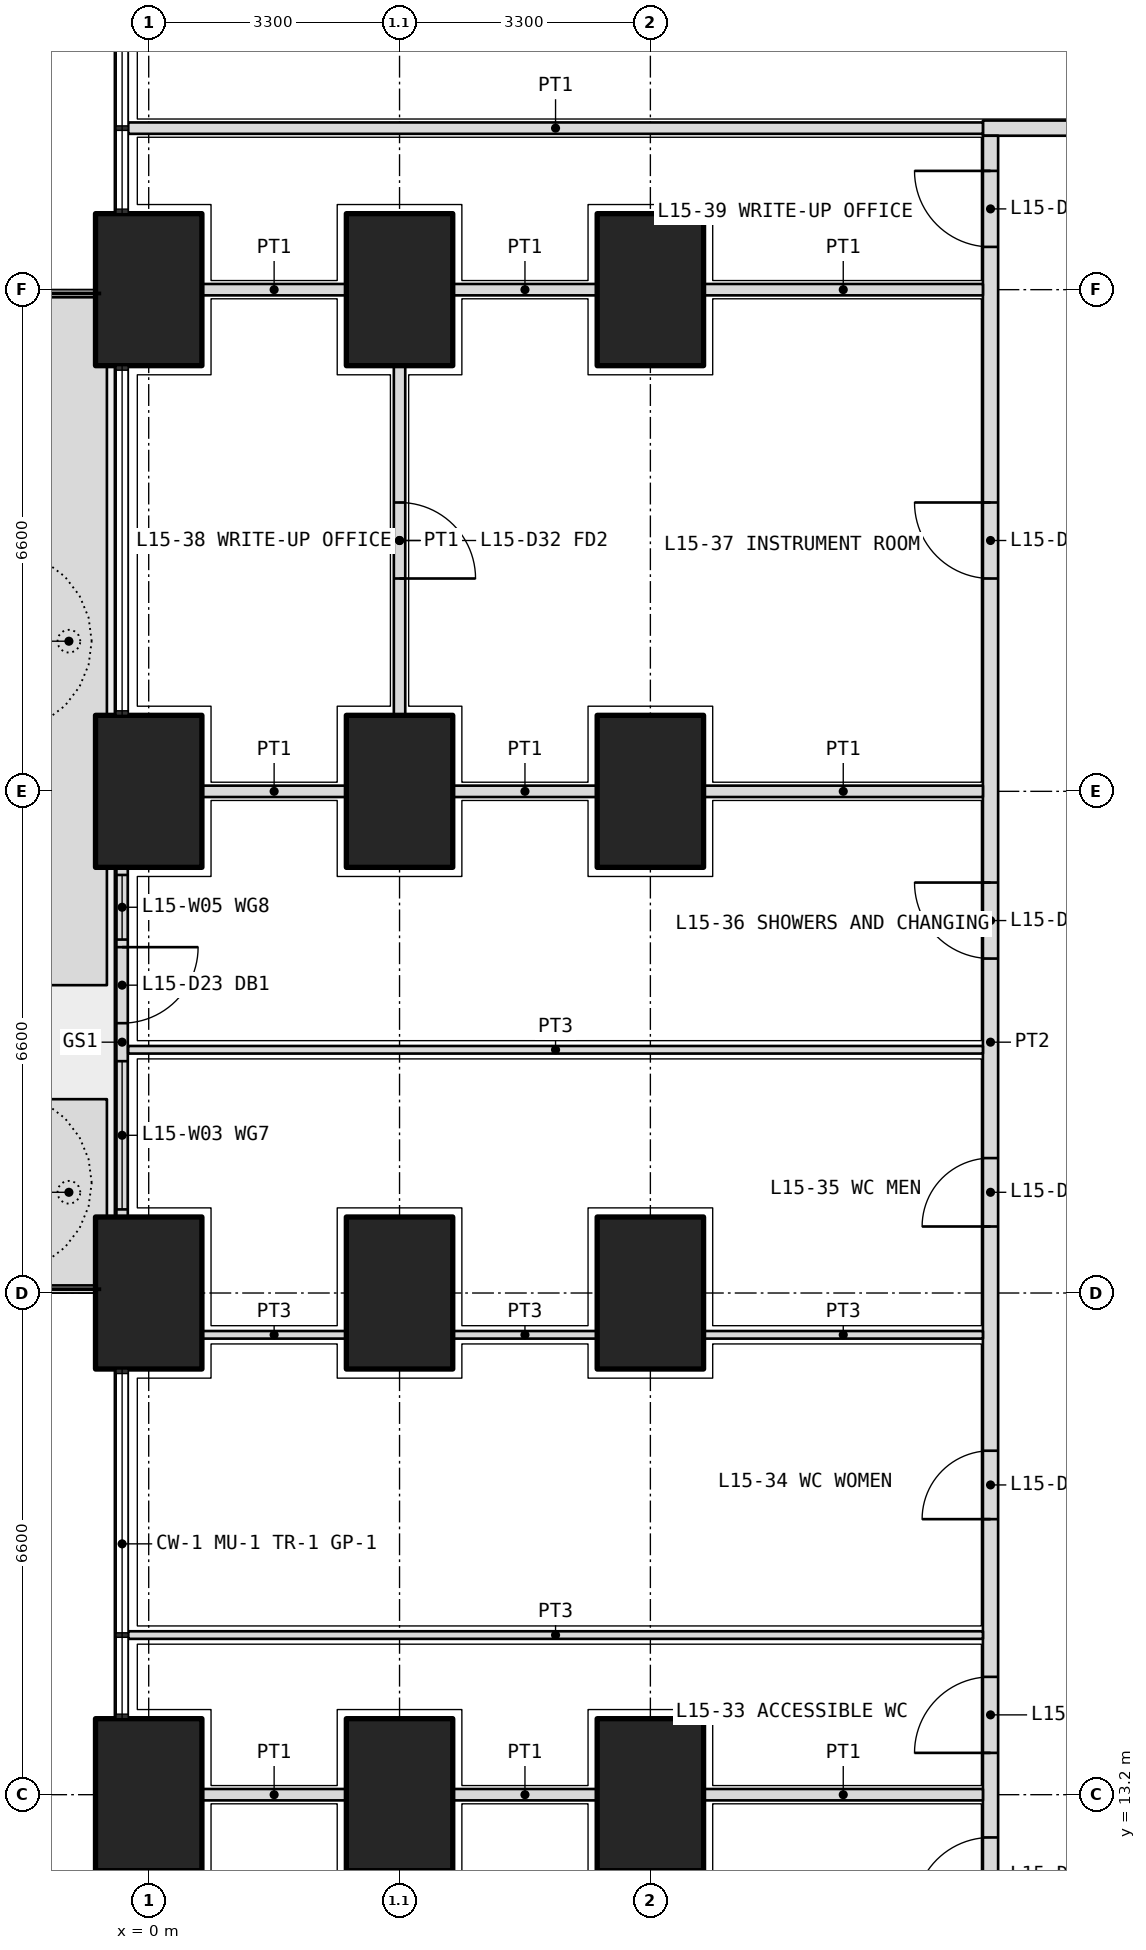
"""IFC4 building model, lengths in metres.
Left out: names, types, materials, properties, quantities, classifications, styles, units other than length and angle.
Written with IfcOpenShell. Run it as: python <this file> out.ifc"""

import sys

from ifc_helpers import new_model, si_unit, direction, frame, frame_2d, origin, origin_2d, place, context, subcontext, project, spatial, polyline, rectangle, outline, extrude, element, fill, save


model = new_model("IFC4")
c1 = context("Model", 3, precision=1e-05, world=origin(), true_north=direction((0.0, 1.0)))
c2 = subcontext(c1, "Body", "Model", "MODEL_VIEW")
j1 = project(units=[si_unit("LENGTHUNIT", "METRE"), si_unit("PLANEANGLEUNIT", "RADIAN")], contexts=[c1])
p1 = place(None, origin())
s1 = spatial("IfcSite", under=j1, at=p1, CompositionType="ELEMENT")
p2 = place(p1, origin())
s2 = spatial("IfcBuilding", under=s1, at=p2, CompositionType="ELEMENT")
p3 = place(p2, frame((0.0, 0.0, 67.5)))
s3 = spatial("IfcBuildingStorey", under=s2, at=p3, CompositionType="ELEMENT", Elevation=67.5)
for number, where, z_axis, x_axis in (
    (1, (0.0, 13.2, 0.0), (0.0, 0.0, 1.0), (0.0, 1.0, 0.0)),
    (2, (0.0, 19.8, 0.0), (0.0, 0.0, 1.0), (0.0, 1.0, 0.0)),
    (3, (0.0, 26.4, 0.0), (0.0, 0.0, 1.0), (0.0, 1.0, 0.0)),
    (4, (0.0, 33.0, 0.0), (0.0, 0.0, 1.0), (0.0, 1.0, 0.0)),
    (5, (3.3, 13.2, 0.0), (0.0, 0.0, 1.0), (0.0, 1.0, 0.0)),
    (6, (3.3, 19.8, 0.0), (0.0, 0.0, 1.0), (0.0, 1.0, 0.0)),
    (7, (3.3, 26.4, 0.0), (0.0, 0.0, 1.0), (0.0, 1.0, 0.0)),
    (8, (3.3, 33.0, 0.0), (0.0, 0.0, 1.0), (0.0, 1.0, 0.0)),
    (9, (6.6, 13.2, 0.0), (0.0, 0.0, 1.0), (0.0, 1.0, 0.0)),
    (10, (6.6, 19.8, 0.0), (0.0, 0.0, 1.0), (0.0, 1.0, 0.0)),
    (11, (6.6, 26.4, 0.0), (0.0, 0.0, 1.0), (0.0, 1.0, 0.0)),
    (12, (6.6, 33.0, 0.0), (0.0, 0.0, 1.0), (0.0, 1.0, 0.0)),
):
    element("IfcColumn", number, at=place(p3, frame(where, z_axis=z_axis, x_axis=x_axis)), inside=s3, PredefinedType="COLUMN", context=c2, shape_type="SweptSolid", body=[
        extrude(rectangle(XDim=2.0, YDim=1.4, at=origin_2d()), origin(), (0.0, 0.0, 1.0), 4.2),
    ])
p4 = place(p3, origin())
e13 = element("IfcWall", 13, at=p4, inside=s3, PredefinedType="USERDEFINED", context=c2, shape_type="SweptSolid", body=[
    extrude(outline(polyline([(-1.55, 19.9), (-0.55, 19.9), (-0.55, 22.35), (-1.55, 22.35), (-1.55, 19.9)]), holes=[polyline([(-1.4, 20.05), (-0.7, 20.05), (-0.7, 22.2), (-1.4, 22.2), (-1.4, 20.05)])]), origin(), (0.0, 0.0, 1.0), 1.05),
])
p5 = place(p3, origin())
e14 = element("IfcWall", 14, at=p5, inside=s3, PredefinedType="USERDEFINED", context=c2, shape_type="SweptSolid", body=[
    extrude(outline(polyline([(-1.55, 23.85), (-0.55, 23.85), (-0.55, 32.9), (-1.55, 32.9), (-1.55, 23.85)]), holes=[polyline([(-1.4, 24.0), (-0.7, 24.0), (-0.7, 32.75), (-1.4, 32.75), (-1.4, 24.0)])]), origin(), (0.0, 0.0, 1.0), 1.05),
])
p6 = place(p3, frame((-0.35, 25.4, 0.0), z_axis=(0.0, 0.0, 1.0), x_axis=(0.0, -1.0, 0.0)))
e15 = element("IfcWall", 15, at=p6, inside=s3, PredefinedType="SOLIDWALL", context=c2, shape_type="SweptSolid", body=[
    extrude(rectangle(XDim=4.6, YDim=0.15, at=frame_2d((2.3, 0.0))), origin(), (0.0, 0.0, 1.0), 2.6),
])
p7 = place(p6, frame((1.05, 0.0, 0.0)))
e16 = element("IfcOpeningElement", 16, at=p7, cuts=e15, PredefinedType="OPENING", context=c2, shape_type="SweptSolid", body=[
    extrude(rectangle(XDim=1.0, YDim=2.4, at=frame_2d((0.5, 1.2))), frame((0.0, 0.085, 0.0), z_axis=(0.0, -1.0, 0.0), x_axis=(1.0, 0.0, 0.0)), (0.0, 0.0, 1.0), 0.17),
])
p8 = place(p6, frame((0.1, 0.0, 0.1)))
e17 = element("IfcOpeningElement", 17, at=p8, cuts=e15, PredefinedType="OPENING", context=c2, shape_type="SweptSolid", body=[
    extrude(rectangle(XDim=0.85, YDim=2.2, at=frame_2d((0.425, 1.1))), frame((0.0, 0.085, 0.0), z_axis=(0.0, -1.0, 0.0), x_axis=(1.0, 0.0, 0.0)), (0.0, 0.0, 1.0), 0.17),
])
p9 = place(p6, frame((2.55, 0.0, 0.1)))
e18 = element("IfcOpeningElement", 18, at=p9, cuts=e15, PredefinedType="OPENING", context=c2, shape_type="SweptSolid", body=[
    extrude(rectangle(XDim=1.95, YDim=2.2, at=frame_2d((0.975, 1.1))), frame((0.0, 0.085, 0.0), z_axis=(0.0, -1.0, 0.0), x_axis=(1.0, 0.0, 0.0)), (0.0, 0.0, 1.0), 0.17),
])
p10 = place(p3, frame((10.975, 35.125, 0.0), z_axis=(0.0, 0.0, 1.0), x_axis=(1.0, 0.0, 0.0)))
e19 = element("IfcWall", 19, at=p10, inside=s3, PredefinedType="PARTITIONING", context=c2, shape_type="SweptSolid", body=[
    extrude(rectangle(XDim=8.825, YDim=0.2, at=frame_2d((4.413, 0.0))), origin(), (0.0, 0.0, 1.0), 2.85),
])
p11 = place(p10, frame((2.312, 0.0, 0.0)))
e20 = element("IfcOpeningElement", 20, at=p11, cuts=e19, PredefinedType="OPENING", context=c2, shape_type="SweptSolid", body=[
    extrude(rectangle(XDim=1.0, YDim=2.1, at=frame_2d((0.5, 1.05))), frame((0.0, 0.11, 0.0), z_axis=(0.0, -1.0, 0.0), x_axis=(1.0, 0.0, 0.0)), (0.0, 0.0, 1.0), 0.22),
])
p12 = place(p10, frame((6.675, 0.0, 0.0)))
e21 = element("IfcOpeningElement", 21, at=p12, cuts=e19, PredefinedType="OPENING", context=c2, shape_type="SweptSolid", body=[
    extrude(rectangle(XDim=1.0, YDim=2.1, at=frame_2d((0.5, 1.05))), frame((0.0, 0.11, 0.0), z_axis=(0.0, -1.0, 0.0), x_axis=(1.0, 0.0, 0.0)), (0.0, 0.0, 1.0), 0.22),
])
p13 = place(p3, frame((11.075, 11.175, 0.0), z_axis=(0.0, 0.0, 1.0), x_axis=(0.0, 1.0, 0.0)))
e22 = element("IfcWall", 22, at=p13, inside=s3, PredefinedType="PARTITIONING", context=c2, shape_type="SweptSolid", body=[
    extrude(rectangle(XDim=23.85, YDim=0.2, at=frame_2d((11.925, 0.0))), origin(), (0.0, 0.0, 1.0), 2.85),
])
p14 = place(p13, frame((0.462, 0.0, 0.0)))
e23 = element("IfcOpeningElement", 23, at=p14, cuts=e22, PredefinedType="OPENING", context=c2, shape_type="SweptSolid", body=[
    extrude(rectangle(XDim=1.0, YDim=2.1, at=frame_2d((0.5, 1.05))), frame((0.0, 0.11, 0.0), z_axis=(0.0, -1.0, 0.0), x_axis=(1.0, 0.0, 0.0)), (0.0, 0.0, 1.0), 0.22),
])
p15 = place(p13, frame((2.575, 0.0, 0.0)))
e24 = element("IfcOpeningElement", 24, at=p15, cuts=e22, PredefinedType="OPENING", context=c2, shape_type="SweptSolid", body=[
    extrude(rectangle(XDim=1.0, YDim=2.1, at=frame_2d((0.5, 1.05))), frame((0.0, 0.11, 0.0), z_axis=(0.0, -1.0, 0.0), x_axis=(1.0, 0.0, 0.0)), (0.0, 0.0, 1.0), 0.22),
])
p16 = place(p13, frame((5.65, 0.0, 0.0)))
e25 = element("IfcOpeningElement", 25, at=p16, cuts=e22, PredefinedType="OPENING", context=c2, shape_type="SweptSolid", body=[
    extrude(rectangle(XDim=0.9, YDim=2.1, at=frame_2d((0.45, 1.05))), frame((0.0, 0.11, 0.0), z_axis=(0.0, -1.0, 0.0), x_axis=(1.0, 0.0, 0.0)), (0.0, 0.0, 1.0), 0.22),
])
p17 = place(p13, frame((9.5, 0.0, 0.0)))
e26 = element("IfcOpeningElement", 26, at=p17, cuts=e22, PredefinedType="OPENING", context=c2, shape_type="SweptSolid", body=[
    extrude(rectangle(XDim=0.9, YDim=2.1, at=frame_2d((0.45, 1.05))), frame((0.0, 0.11, 0.0), z_axis=(0.0, -1.0, 0.0), x_axis=(1.0, 0.0, 0.0)), (0.0, 0.0, 1.0), 0.22),
])
p18 = place(p13, frame((13.025, 0.0, 0.0)))
e27 = element("IfcOpeningElement", 27, at=p18, cuts=e22, PredefinedType="OPENING", context=c2, shape_type="SweptSolid", body=[
    extrude(rectangle(XDim=1.0, YDim=2.1, at=frame_2d((0.5, 1.05))), frame((0.0, 0.11, 0.0), z_axis=(0.0, -1.0, 0.0), x_axis=(1.0, 0.0, 0.0)), (0.0, 0.0, 1.0), 0.22),
])
p19 = place(p13, frame((18.025, 0.0, 0.0)))
e28 = element("IfcOpeningElement", 28, at=p19, cuts=e22, PredefinedType="OPENING", context=c2, shape_type="SweptSolid", body=[
    extrude(rectangle(XDim=1.0, YDim=2.1, at=frame_2d((0.5, 1.05))), frame((0.0, 0.11, 0.0), z_axis=(0.0, -1.0, 0.0), x_axis=(1.0, 0.0, 0.0)), (0.0, 0.0, 1.0), 0.22),
])
p20 = place(p13, frame((22.387, 0.0, 0.0)))
e29 = element("IfcOpeningElement", 29, at=p20, cuts=e22, PredefinedType="OPENING", context=c2, shape_type="SweptSolid", body=[
    extrude(rectangle(XDim=1.0, YDim=2.1, at=frame_2d((0.5, 1.05))), frame((0.0, 0.11, 0.0), z_axis=(0.0, -1.0, 0.0), x_axis=(1.0, 0.0, 0.0)), (0.0, 0.0, 1.0), 0.22),
])
p21 = place(p3, frame((-0.27, 35.125, 0.0), z_axis=(0.0, 0.0, 1.0), x_axis=(1.0, 0.0, 0.0)))
e30 = element("IfcWall", 30, at=p21, inside=s3, PredefinedType="PARTITIONING", context=c2, shape_type="SweptSolid", body=[
    extrude(rectangle(XDim=11.245, YDim=0.15, at=frame_2d((5.623, 0.0))), origin(), (0.0, 0.0, 1.0), 2.6),
])
p22 = place(p3, frame((3.3, 32.0, 0.0), z_axis=(0.0, 0.0, 1.0), x_axis=(0.0, -1.0, 0.0)))
e31 = element("IfcWall", 31, at=p22, inside=s3, PredefinedType="PARTITIONING", context=c2, shape_type="SweptSolid", body=[
    extrude(rectangle(XDim=4.6, YDim=0.15, at=frame_2d((2.3, 0.0))), origin(), (0.0, 0.0, 1.0), 3.9),
])
p23 = place(p22, frame((1.8, 0.0, 0.0)))
e32 = element("IfcOpeningElement", 32, at=p23, cuts=e31, PredefinedType="OPENING", context=c2, shape_type="SweptSolid", body=[
    extrude(rectangle(XDim=1.0, YDim=2.1, at=frame_2d((0.5, 1.05))), frame((0.0, 0.085, 0.0), z_axis=(0.0, -1.0, 0.0), x_axis=(1.0, 0.0, 0.0)), (0.0, 0.0, 1.0), 0.17),
])
p24 = place(p3, frame((3.3, 12.2, 0.0), z_axis=(0.0, 0.0, 1.0), x_axis=(0.0, -1.0, 0.0)))
e33 = element("IfcWall", 33, at=p24, inside=s3, PredefinedType="PARTITIONING", context=c2, shape_type="SweptSolid", body=[
    extrude(rectangle(XDim=4.6, YDim=0.15, at=frame_2d((2.3, 0.0))), origin(), (0.0, 0.0, 1.0), 3.9),
])
p25 = place(p24, frame((3.35, 0.0, 0.0)))
e34 = element("IfcOpeningElement", 34, at=p25, cuts=e33, PredefinedType="OPENING", context=c2, shape_type="SweptSolid", body=[
    extrude(rectangle(XDim=1.0, YDim=2.1, at=frame_2d((0.5, 1.05))), frame((0.0, 0.085, 0.0), z_axis=(0.0, -1.0, 0.0), x_axis=(1.0, 0.0, 0.0)), (0.0, 0.0, 1.0), 0.17),
])
p26 = place(p3, frame((-0.27, 15.3, 0.0), z_axis=(0.0, 0.0, 1.0), x_axis=(1.0, 0.0, 0.0)))
e35 = element("IfcWall", 35, at=p26, inside=s3, PredefinedType="PARTITIONING", context=c2, shape_type="SweptSolid", body=[
    extrude(rectangle(XDim=11.245, YDim=0.1, at=frame_2d((5.623, 0.0))), origin(), (0.0, 0.0, 1.0), 2.6),
])
p27 = place(p3, frame((0.7, 19.25, 0.0), z_axis=(0.0, 0.0, 1.0), x_axis=(1.0, 0.0, 0.0)))
e36 = element("IfcWall", 36, at=p27, inside=s3, PredefinedType="PARTITIONING", context=c2, shape_type="SweptSolid", body=[
    extrude(rectangle(XDim=1.9, YDim=0.1, at=frame_2d((0.95, 0.0))), origin(), (0.0, 0.0, 1.0), 2.85),
])
p28 = place(p3, frame((4.0, 19.25, 0.0), z_axis=(0.0, 0.0, 1.0), x_axis=(1.0, 0.0, 0.0)))
e37 = element("IfcWall", 37, at=p28, inside=s3, PredefinedType="PARTITIONING", context=c2, shape_type="SweptSolid", body=[
    extrude(rectangle(XDim=1.9, YDim=0.1, at=frame_2d((0.95, 0.0))), origin(), (0.0, 0.0, 1.0), 2.85),
])
p29 = place(p3, frame((7.3, 19.25, 0.0), z_axis=(0.0, 0.0, 1.0), x_axis=(1.0, 0.0, 0.0)))
e38 = element("IfcWall", 38, at=p29, inside=s3, PredefinedType="PARTITIONING", context=c2, shape_type="SweptSolid", body=[
    extrude(rectangle(XDim=3.675, YDim=0.1, at=frame_2d((1.837, 0.0))), origin(), (0.0, 0.0, 1.0), 2.85),
])
p30 = place(p3, frame((-0.27, 23.0, 0.0), z_axis=(0.0, 0.0, 1.0), x_axis=(1.0, 0.0, 0.0)))
e39 = element("IfcWall", 39, at=p30, inside=s3, PredefinedType="PARTITIONING", context=c2, shape_type="SweptSolid", body=[
    extrude(rectangle(XDim=11.245, YDim=0.1, at=frame_2d((5.623, 0.0))), origin(), (0.0, 0.0, 1.0), 2.6),
])
p31 = place(p3, frame((0.7, 13.2, 0.0), z_axis=(0.0, 0.0, 1.0), x_axis=(1.0, 0.0, 0.0)))
e40 = element("IfcWall", 40, at=p31, inside=s3, PredefinedType="PARTITIONING", context=c2, shape_type="SweptSolid", body=[
    extrude(rectangle(XDim=1.9, YDim=0.15, at=frame_2d((0.95, 0.0))), origin(), (0.0, 0.0, 1.0), 2.85),
])
p32 = place(p3, frame((4.0, 13.2, 0.0), z_axis=(0.0, 0.0, 1.0), x_axis=(1.0, 0.0, 0.0)))
e41 = element("IfcWall", 41, at=p32, inside=s3, PredefinedType="PARTITIONING", context=c2, shape_type="SweptSolid", body=[
    extrude(rectangle(XDim=1.9, YDim=0.15, at=frame_2d((0.95, 0.0))), origin(), (0.0, 0.0, 1.0), 2.85),
])
p33 = place(p3, frame((7.3, 13.2, 0.0), z_axis=(0.0, 0.0, 1.0), x_axis=(1.0, 0.0, 0.0)))
e42 = element("IfcWall", 42, at=p33, inside=s3, PredefinedType="PARTITIONING", context=c2, shape_type="SweptSolid", body=[
    extrude(rectangle(XDim=3.675, YDim=0.15, at=frame_2d((1.837, 0.0))), origin(), (0.0, 0.0, 1.0), 2.85),
])
p34 = place(p3, frame((0.7, 26.4, 0.0), z_axis=(0.0, 0.0, 1.0), x_axis=(1.0, 0.0, 0.0)))
e43 = element("IfcWall", 43, at=p34, inside=s3, PredefinedType="PARTITIONING", context=c2, shape_type="SweptSolid", body=[
    extrude(rectangle(XDim=1.9, YDim=0.15, at=frame_2d((0.95, 0.0))), origin(), (0.0, 0.0, 1.0), 2.85),
])
p35 = place(p3, frame((4.0, 26.4, 0.0), z_axis=(0.0, 0.0, 1.0), x_axis=(1.0, 0.0, 0.0)))
e44 = element("IfcWall", 44, at=p35, inside=s3, PredefinedType="PARTITIONING", context=c2, shape_type="SweptSolid", body=[
    extrude(rectangle(XDim=1.9, YDim=0.15, at=frame_2d((0.95, 0.0))), origin(), (0.0, 0.0, 1.0), 2.85),
])
p36 = place(p3, frame((7.3, 26.4, 0.0), z_axis=(0.0, 0.0, 1.0), x_axis=(1.0, 0.0, 0.0)))
e45 = element("IfcWall", 45, at=p36, inside=s3, PredefinedType="PARTITIONING", context=c2, shape_type="SweptSolid", body=[
    extrude(rectangle(XDim=3.675, YDim=0.15, at=frame_2d((1.837, 0.0))), origin(), (0.0, 0.0, 1.0), 2.85),
])
p37 = place(p3, frame((0.7, 33.0, 0.0), z_axis=(0.0, 0.0, 1.0), x_axis=(1.0, 0.0, 0.0)))
e46 = element("IfcWall", 46, at=p37, inside=s3, PredefinedType="PARTITIONING", context=c2, shape_type="SweptSolid", body=[
    extrude(rectangle(XDim=1.9, YDim=0.15, at=frame_2d((0.95, 0.0))), origin(), (0.0, 0.0, 1.0), 2.85),
])
p38 = place(p3, frame((4.0, 33.0, 0.0), z_axis=(0.0, 0.0, 1.0), x_axis=(1.0, 0.0, 0.0)))
e47 = element("IfcWall", 47, at=p38, inside=s3, PredefinedType="PARTITIONING", context=c2, shape_type="SweptSolid", body=[
    extrude(rectangle(XDim=1.9, YDim=0.15, at=frame_2d((0.95, 0.0))), origin(), (0.0, 0.0, 1.0), 2.85),
])
p39 = place(p3, frame((7.3, 33.0, 0.0), z_axis=(0.0, 0.0, 1.0), x_axis=(1.0, 0.0, 0.0)))
e48 = element("IfcWall", 48, at=p39, inside=s3, PredefinedType="PARTITIONING", context=c2, shape_type="SweptSolid", body=[
    extrude(rectangle(XDim=3.675, YDim=0.15, at=frame_2d((1.837, 0.0))), origin(), (0.0, 0.0, 1.0), 2.85),
])
p40 = place(p7, origin())
e49 = element("IfcDoor", 49, at=p40, inside=s3, OperationType="SINGLE_SWING_LEFT", PredefinedType="DOOR", context=c2, shape_type="SweptSolid", body=[
    extrude(rectangle(XDim=1.0, YDim=2.4, at=frame_2d((0.5, 1.2))), frame((0.0, 0.025, 0.0), z_axis=(0.0, -1.0, 0.0), x_axis=(1.0, 0.0, 0.0)), (0.0, 0.0, 1.0), 0.05),
])
fill(e16, e49)
p41 = place(p8, origin())
e50 = element("IfcWindow", 50, at=p41, inside=s3, PartitioningType="SINGLE_PANEL", PredefinedType="WINDOW", context=c2, shape_type="SweptSolid", body=[
    extrude(rectangle(XDim=0.85, YDim=2.2, at=frame_2d((0.425, 1.1))), frame((0.0, 0.03, 0.0), z_axis=(0.0, -1.0, 0.0), x_axis=(1.0, 0.0, 0.0)), (0.0, 0.0, 1.0), 0.06),
])
fill(e17, e50)
p42 = place(p9, origin())
e51 = element("IfcWindow", 51, at=p42, inside=s3, PartitioningType="SINGLE_PANEL", PredefinedType="WINDOW", context=c2, shape_type="SweptSolid", body=[
    extrude(rectangle(XDim=1.95, YDim=2.2, at=frame_2d((0.975, 1.1))), frame((0.0, 0.03, 0.0), z_axis=(0.0, -1.0, 0.0), x_axis=(1.0, 0.0, 0.0)), (0.0, 0.0, 1.0), 0.06),
])
fill(e18, e51)
p43 = place(p14, origin())
e52 = element("IfcDoor", 52, at=p43, inside=s3, OperationType="SINGLE_SWING_LEFT", PredefinedType="DOOR", context=c2, shape_type="SweptSolid", body=[
    extrude(rectangle(XDim=1.0, YDim=2.1, at=frame_2d((0.5, 1.05))), frame((0.0, 0.025, 0.0), z_axis=(0.0, -1.0, 0.0), x_axis=(1.0, 0.0, 0.0)), (0.0, 0.0, 1.0), 0.05),
])
fill(e23, e52)
p44 = place(p15, origin())
e53 = element("IfcDoor", 53, at=p44, inside=s3, OperationType="SINGLE_SWING_LEFT", PredefinedType="DOOR", context=c2, shape_type="SweptSolid", body=[
    extrude(rectangle(XDim=1.0, YDim=2.1, at=frame_2d((0.5, 1.05))), frame((0.0, 0.025, 0.0), z_axis=(0.0, -1.0, 0.0), x_axis=(1.0, 0.0, 0.0)), (0.0, 0.0, 1.0), 0.05),
])
fill(e24, e53)
p45 = place(p16, origin())
e54 = element("IfcDoor", 54, at=p45, inside=s3, OperationType="SINGLE_SWING_LEFT", PredefinedType="DOOR", context=c2, shape_type="SweptSolid", body=[
    extrude(rectangle(XDim=0.9, YDim=2.1, at=frame_2d((0.45, 1.05))), frame((0.0, 0.025, 0.0), z_axis=(0.0, -1.0, 0.0), x_axis=(1.0, 0.0, 0.0)), (0.0, 0.0, 1.0), 0.05),
])
fill(e25, e54)
p46 = place(p17, origin())
e55 = element("IfcDoor", 55, at=p46, inside=s3, OperationType="SINGLE_SWING_LEFT", PredefinedType="DOOR", context=c2, shape_type="SweptSolid", body=[
    extrude(rectangle(XDim=0.9, YDim=2.1, at=frame_2d((0.45, 1.05))), frame((0.0, 0.025, 0.0), z_axis=(0.0, -1.0, 0.0), x_axis=(1.0, 0.0, 0.0)), (0.0, 0.0, 1.0), 0.05),
])
fill(e26, e55)
p47 = place(p18, origin())
e56 = element("IfcDoor", 56, at=p47, inside=s3, OperationType="SINGLE_SWING_RIGHT", PredefinedType="DOOR", context=c2, shape_type="SweptSolid", body=[
    extrude(rectangle(XDim=1.0, YDim=2.1, at=frame_2d((0.5, 1.05))), frame((0.0, 0.025, 0.0), z_axis=(0.0, -1.0, 0.0), x_axis=(1.0, 0.0, 0.0)), (0.0, 0.0, 1.0), 0.05),
])
fill(e27, e56)
p48 = place(p19, origin())
e57 = element("IfcDoor", 57, at=p48, inside=s3, OperationType="SINGLE_SWING_RIGHT", PredefinedType="DOOR", context=c2, shape_type="SweptSolid", body=[
    extrude(rectangle(XDim=1.0, YDim=2.1, at=frame_2d((0.5, 1.05))), frame((0.0, 0.025, 0.0), z_axis=(0.0, -1.0, 0.0), x_axis=(1.0, 0.0, 0.0)), (0.0, 0.0, 1.0), 0.05),
])
fill(e28, e57)
p49 = place(p23, origin())
e58 = element("IfcDoor", 58, at=p49, inside=s3, OperationType="SINGLE_SWING_RIGHT", PredefinedType="DOOR", context=c2, shape_type="SweptSolid", body=[
    extrude(rectangle(XDim=1.0, YDim=2.1, at=frame_2d((0.5, 1.05))), frame((0.0, 0.025, 0.0), z_axis=(0.0, -1.0, 0.0), x_axis=(1.0, 0.0, 0.0)), (0.0, 0.0, 1.0), 0.05),
])
fill(e32, e58)
p50 = place(p20, origin())
e59 = element("IfcDoor", 59, at=p50, inside=s3, OperationType="SINGLE_SWING_RIGHT", PredefinedType="DOOR", context=c2, shape_type="SweptSolid", body=[
    extrude(rectangle(XDim=1.0, YDim=2.1, at=frame_2d((0.5, 1.05))), frame((0.0, 0.025, 0.0), z_axis=(0.0, -1.0, 0.0), x_axis=(1.0, 0.0, 0.0)), (0.0, 0.0, 1.0), 0.05),
])
fill(e29, e59)
save(model, sys.argv[1])
